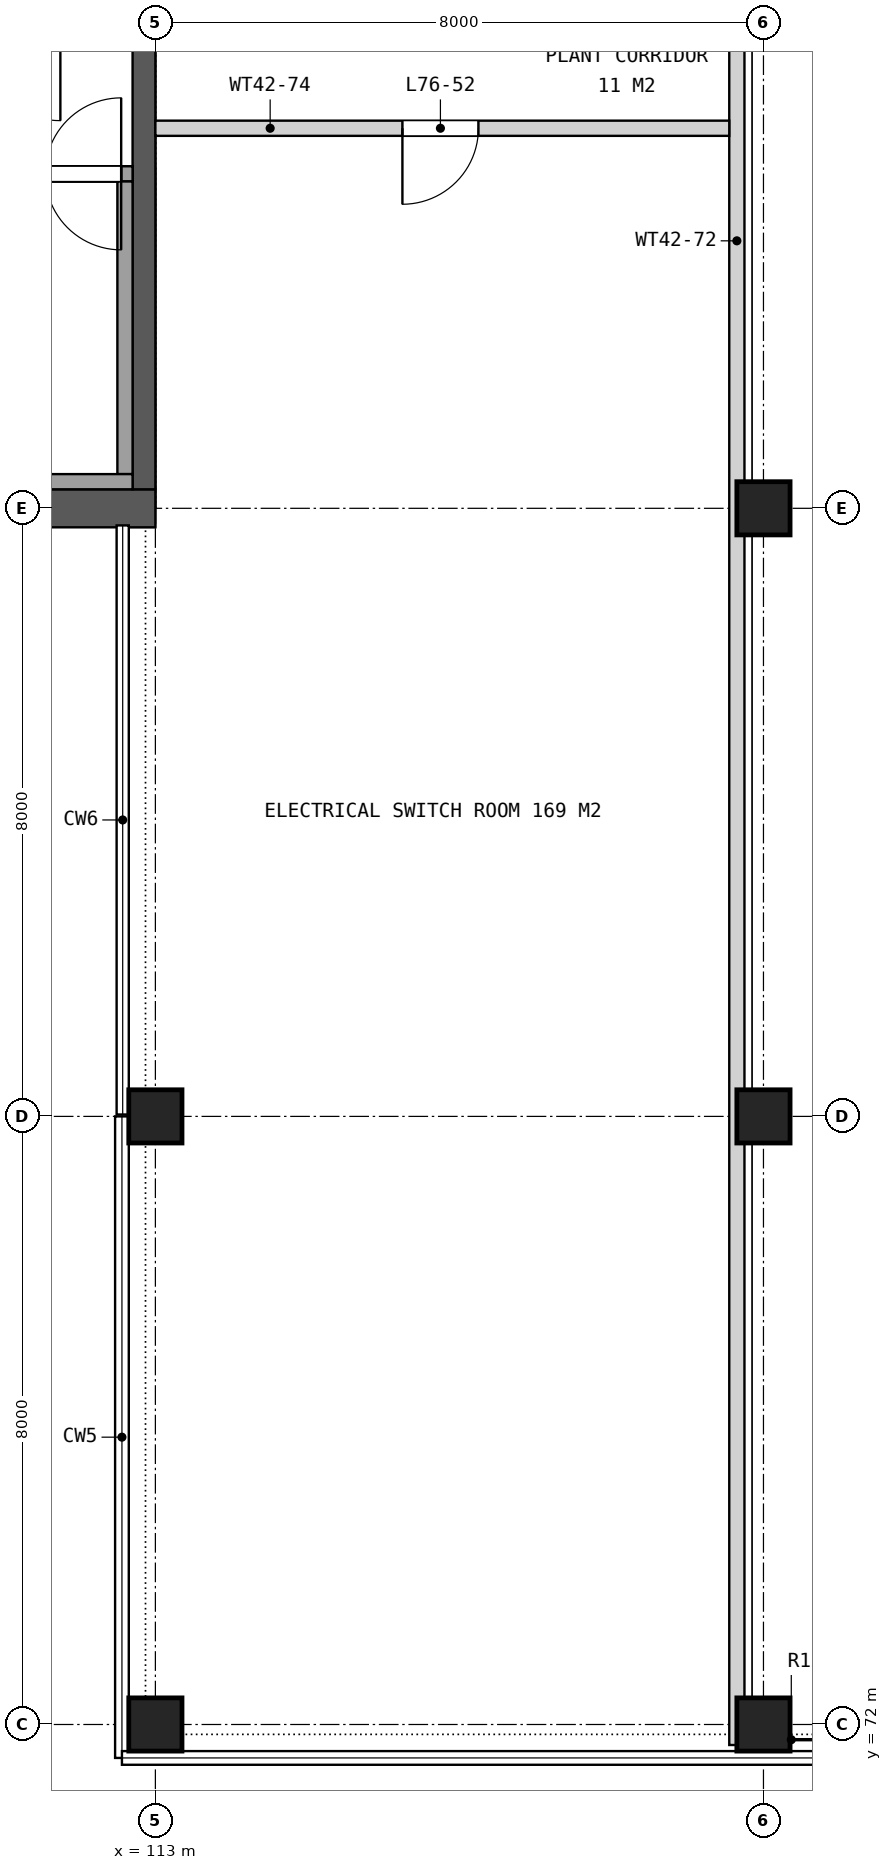
"""IFC4 building model, lengths in metres.
Left out: names, types, materials, properties, quantities, classifications, styles, units other than length and angle.
Written with IfcOpenShell. Run it as: python <this file> out.ifc"""

import sys

from ifc_helpers import new_model, si_unit, direction, frame, frame_2d, origin, origin_2d, place, context, subcontext, project, spatial, rectangle, extrude, element, fill, save


model = new_model("IFC4")
c1 = context("Model", 3, precision=1e-05, world=origin(), true_north=direction((0.0, 1.0)))
c2 = subcontext(c1, "Body", "Model", "MODEL_VIEW")
j1 = project(units=[si_unit("LENGTHUNIT", "METRE"), si_unit("PLANEANGLEUNIT", "RADIAN")], contexts=[c1])
p1 = place(None, origin())
s1 = spatial("IfcSite", under=j1, at=p1, CompositionType="ELEMENT")
p2 = place(p1, origin())
s2 = spatial("IfcBuilding", under=s1, at=p2, CompositionType="ELEMENT")
p3 = place(p2, frame((0.0, 0.0, 349.1)))
s3 = spatial("IfcBuildingStorey", under=s2, at=p3, CompositionType="ELEMENT", Elevation=349.1)
for number, where, z_axis, x_axis in (
    (1, (113.0, 72.0, 0.0), (0.0, 0.0, 1.0), (1.0, 0.0, 0.0)),
    (2, (113.0, 80.0, 0.0), (0.0, 0.0, 1.0), (1.0, 0.0, 0.0)),
    (3, (121.0, 72.0, 0.0), (0.0, 0.0, 1.0), (1.0, 0.0, 0.0)),
    (4, (121.0, 80.0, 0.0), (0.0, 0.0, 1.0), (1.0, 0.0, 0.0)),
    (5, (121.0, 88.0, 0.0), (0.0, 0.0, 1.0), (1.0, 0.0, 0.0)),
):
    element("IfcColumn", number, at=place(p3, frame(where, z_axis=z_axis, x_axis=x_axis)), inside=s3, PredefinedType="COLUMN", context=c2, shape_type="SweptSolid", body=[
        extrude(rectangle(XDim=0.7, YDim=0.7, at=origin_2d()), origin(), (0.0, 0.0, 1.0), 10.23),
    ])
p4 = place(p3, frame((113.0, 88.0, 0.0), z_axis=(0.0, 0.0, 1.0), x_axis=(-1.0, 0.0, 0.0)))
e6 = element("IfcWall", 6, at=p4, inside=s3, PredefinedType="SHEAR", context=c2, shape_type="SweptSolid", body=[
    extrude(rectangle(XDim=7.1, YDim=0.5, at=frame_2d((3.55, 0.0))), origin(), (0.0, 0.0, 1.0), 12.0),
])
p5 = place(p3, frame((112.85, 94.3, 0.0), z_axis=(0.0, 0.0, 1.0), x_axis=(0.0, -1.0, 0.0)))
e7 = element("IfcWall", 7, at=p5, inside=s3, PredefinedType="SHEAR", context=c2, shape_type="SweptSolid", body=[
    extrude(rectangle(XDim=6.05, YDim=0.3, at=frame_2d((3.025, 0.0))), origin(), (0.0, 0.0, 1.0), 12.0),
])
p6 = place(p3, frame((112.7, 92.4, 0.0), z_axis=(0.0, 0.0, 1.0), x_axis=(-1.0, 0.0, 0.0)))
e8 = element("IfcWall", 8, at=p6, inside=s3, PredefinedType="SHEAR", context=c2, shape_type="SweptSolid", body=[
    extrude(rectangle(XDim=6.8, YDim=0.2, at=frame_2d((3.4, 0.0))), origin(), (0.0, 0.0, 1.0), 11.6),
])
p7 = place(p6, frame((0.15, 0.0, 0.0)))
e9 = element("IfcOpeningElement", 9, at=p7, cuts=e8, PredefinedType="OPENING", context=c2, shape_type="SweptSolid", body=[
    extrude(rectangle(XDim=1.0, YDim=2.1, at=frame_2d((0.5, 1.05))), frame((0.0, 0.11, 0.0), z_axis=(0.0, -1.0, 0.0), x_axis=(1.0, 0.0, 0.0)), (0.0, 0.0, 1.0), 0.22),
])
p8 = place(p6, frame((0.15, 0.0, 9.2)))
e10 = element("IfcOpeningElement", 10, at=p8, cuts=e8, PredefinedType="OPENING", context=c2, shape_type="SweptSolid", body=[
    extrude(rectangle(XDim=1.0, YDim=2.1, at=frame_2d((0.5, 1.05))), frame((0.0, 0.11, 0.0), z_axis=(0.0, -1.0, 0.0), x_axis=(1.0, 0.0, 0.0)), (0.0, 0.0, 1.0), 0.22),
])
p9 = place(p3, frame((120.65, 71.73, 0.0), z_axis=(0.0, 0.0, 1.0), x_axis=(0.0, 1.0, 0.0)))
e11 = element("IfcWall", 11, at=p9, inside=s3, PredefinedType="SOLIDWALL", context=c2, shape_type="SweptSolid", body=[
    extrude(rectangle(XDim=56.54, YDim=0.2, at=frame_2d((28.27, 0.0))), origin(), (0.0, 0.0, 1.0), 11.6),
])
p10 = place(p9, frame((27.32, 0.0, 0.0)))
e12 = element("IfcOpeningElement", 12, at=p10, cuts=e11, PredefinedType="OPENING", context=c2, shape_type="SweptSolid", body=[
    extrude(rectangle(XDim=1.8, YDim=2.1, at=frame_2d((0.9, 1.05))), frame((0.0, 0.11, 0.0), z_axis=(0.0, -1.0, 0.0), x_axis=(1.0, 0.0, 0.0)), (0.0, 0.0, 1.0), 0.22),
])
p11 = place(p3, frame((113.0, 93.0, 0.0), z_axis=(0.0, 0.0, 1.0), x_axis=(1.0, 0.0, 0.0)))
e13 = element("IfcWall", 13, at=p11, inside=s3, PredefinedType="SOLIDWALL", context=c2, shape_type="SweptSolid", body=[
    extrude(rectangle(XDim=7.55, YDim=0.2, at=frame_2d((3.775, 0.0))), origin(), (0.0, 0.0, 1.0), 11.6),
])
p12 = place(p11, frame((3.25, 0.0, 0.0)))
e14 = element("IfcOpeningElement", 14, at=p12, cuts=e13, PredefinedType="OPENING", context=c2, shape_type="SweptSolid", body=[
    extrude(rectangle(XDim=1.0, YDim=2.1, at=frame_2d((0.5, 1.05))), frame((0.0, 0.11, 0.0), z_axis=(0.0, -1.0, 0.0), x_axis=(1.0, 0.0, 0.0)), (0.0, 0.0, 1.0), 0.22),
])
p13 = place(p7, origin())
e15 = element("IfcDoor", 15, at=p13, inside=s3, OperationType="SINGLE_SWING_LEFT", PredefinedType="DOOR", context=c2, shape_type="SweptSolid", body=[
    extrude(rectangle(XDim=1.0, YDim=2.1, at=frame_2d((0.5, 1.05))), frame((0.0, 0.025, 0.0), z_axis=(0.0, -1.0, 0.0), x_axis=(1.0, 0.0, 0.0)), (0.0, 0.0, 1.0), 0.05),
])
fill(e9, e15)
p14 = place(p8, frame((1.0, 0.0, 0.0), z_axis=(0.0, 0.0, 1.0), x_axis=(-1.0, 0.0, 0.0)))
e16 = element("IfcDoor", 16, at=p14, inside=s3, OperationType="SINGLE_SWING_RIGHT", PredefinedType="DOOR", context=c2, shape_type="SweptSolid", body=[
    extrude(rectangle(XDim=1.0, YDim=2.1, at=frame_2d((0.5, 1.05))), frame((0.0, 0.025, 0.0), z_axis=(0.0, -1.0, 0.0), x_axis=(1.0, 0.0, 0.0)), (0.0, 0.0, 1.0), 0.05),
])
fill(e10, e16)
p15 = place(p12, frame((1.0, 0.0, 0.0), z_axis=(0.0, 0.0, 1.0), x_axis=(-1.0, 0.0, 0.0)))
e17 = element("IfcDoor", 17, at=p15, inside=s3, OperationType="SINGLE_SWING_RIGHT", PredefinedType="DOOR", context=c2, shape_type="SweptSolid", body=[
    extrude(rectangle(XDim=1.0, YDim=2.1, at=frame_2d((0.5, 1.05))), frame((0.0, 0.025, 0.0), z_axis=(0.0, -1.0, 0.0), x_axis=(1.0, 0.0, 0.0)), (0.0, 0.0, 1.0), 0.05),
])
fill(e14, e17)
save(model, sys.argv[1])
